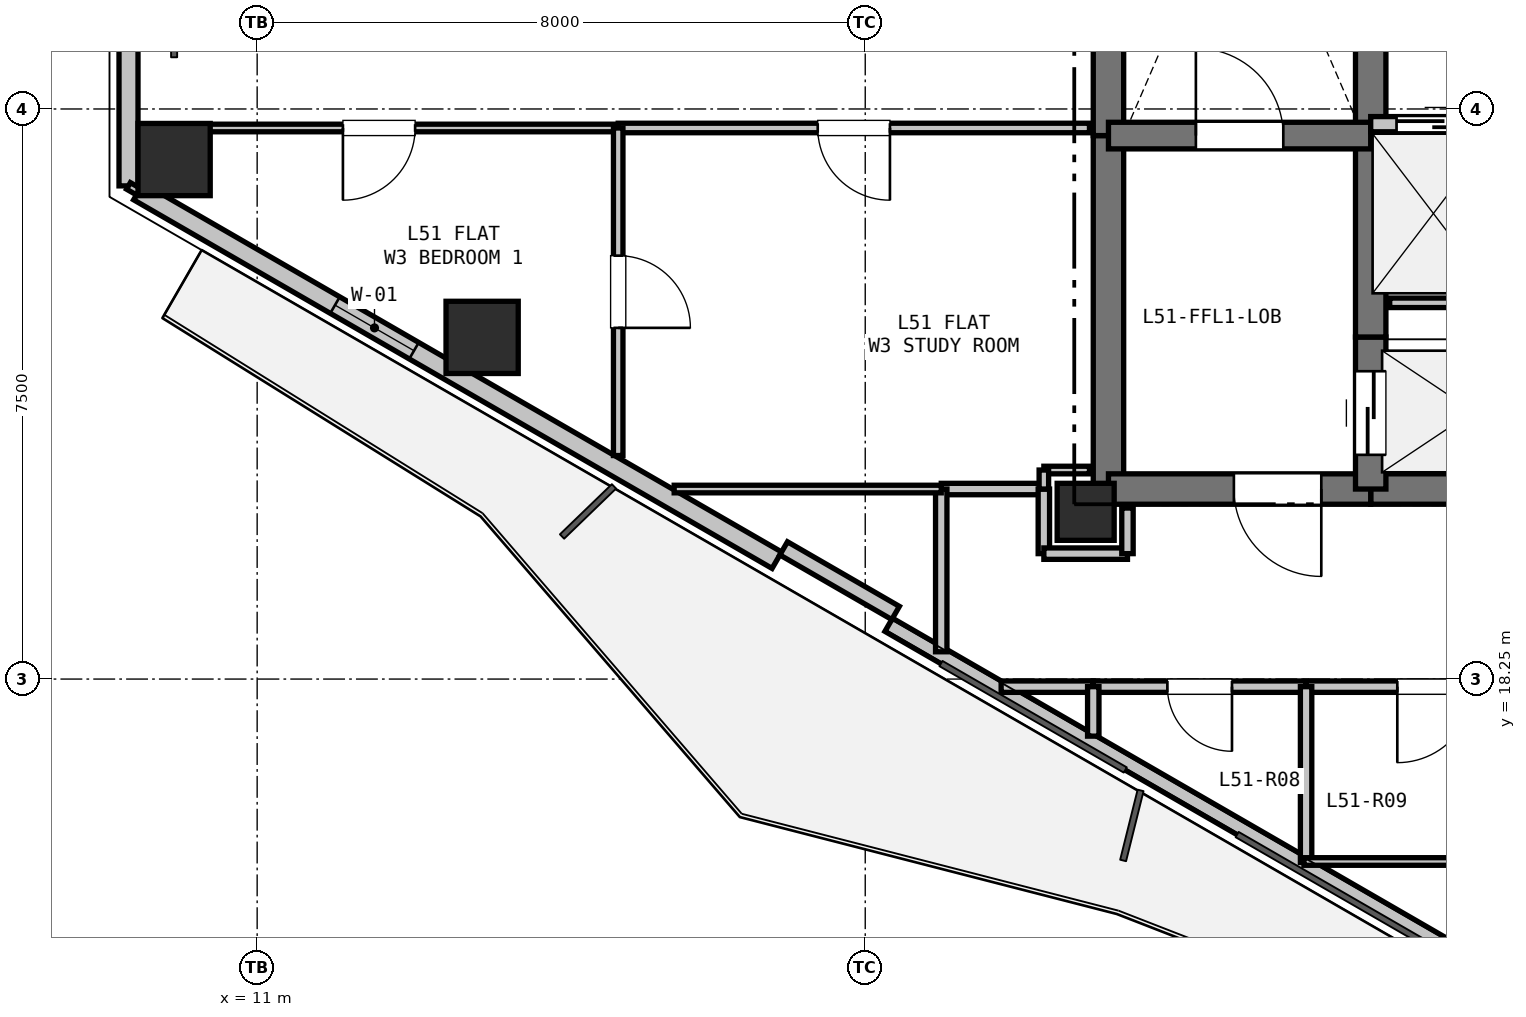
"""IFC4 building model, lengths in metres.
Left out: names, types, materials, properties, quantities, classifications, styles, units other than length and angle.
Written with IfcOpenShell. Run it as: python <this file> out.ifc"""

import sys

from ifc_helpers import new_model, si_unit, direction, frame, frame_2d, origin, origin_2d, place, context, subcontext, project, spatial, rectangle, hollow_rectangle, extrude, element, fill, save


model = new_model("IFC4")
c1 = context("Model", 3, precision=1e-05, world=origin(), true_north=direction((0.0, 1.0)))
c2 = subcontext(c1, "Body", "Model", "MODEL_VIEW")
j1 = project(units=[si_unit("LENGTHUNIT", "METRE"), si_unit("PLANEANGLEUNIT", "RADIAN")], contexts=[c1])
p1 = place(None, origin())
s1 = spatial("IfcSite", under=j1, at=p1, CompositionType="ELEMENT")
p2 = place(p1, origin())
s2 = spatial("IfcBuilding", under=s1, at=p2, CompositionType="ELEMENT")
p3 = place(p2, frame((0.0, 0.0, 185.4)))
s3 = spatial("IfcBuildingStorey", under=s2, at=p3, CompositionType="ELEMENT", Elevation=185.4)
p4 = place(p3, frame((21.9, 20.45, 0.0), z_axis=(0.0, 0.0, 1.0), x_axis=(1.0, 0.0, 0.0)))
e1 = element("IfcColumn", 1, at=p4, inside=s3, PredefinedType="COLUMN", context=c2, shape_type="SweptSolid", body=[
    extrude(rectangle(XDim=0.75, YDim=0.75, at=origin_2d()), origin(), (0.0, 0.0, 1.0), 3.3),
])
for number, where, z_axis, x_axis in (
    (2, (13.96, 22.745, 0.0), (0.0, 0.0, 1.0), (1.0, 0.0, 0.0)),
    (3, (9.907, 25.085, 0.0), (0.0, 0.0, 1.0), (1.0, 0.0, 0.0)),
):
    element("IfcColumn", number, at=place(p3, frame(where, z_axis=z_axis, x_axis=x_axis)), inside=s3, PredefinedType="COLUMN", context=c2, shape_type="SweptSolid", body=[
        extrude(hollow_rectangle(XDim=0.95, YDim=0.95, WallThickness=0.028, at=origin_2d()), origin(), (0.0, 0.0, 1.0), 3.3),
    ])
p5 = place(p3, frame((9.308, 24.738, 0.0), z_axis=(0.0, 0.0, 1.0), x_axis=(0.0, 1.0, 0.0)))
e4 = element("IfcWall", 4, at=p5, inside=s3, PredefinedType="SOLIDWALL", context=c2, shape_type="SweptSolid", body=[
    extrude(rectangle(XDim=4.023, YDim=0.25, at=frame_2d((2.012, 0.0))), origin(), (0.0, 0.0, 1.0), 2.69),
])
p6 = place(p3, frame((27.102, 14.464, 0.0), z_axis=(0.0, 0.0, 1.0), x_axis=(-0.866020680503, 0.500008180874, 0.0)))
e5 = element("IfcWall", 5, at=p6, inside=s3, PredefinedType="PARAPET", context=c2, shape_type="SweptSolid", body=[
    extrude(rectangle(XDim=8.999, YDim=0.2, at=frame_2d((4.5, 0.0))), origin(), (0.0, 0.0, 1.0), 0.2),
])
p7 = place(p3, frame((17.837, 19.814, 0.0), z_axis=(0.0, 0.0, 1.0), x_axis=(-0.866027133173, 0.499997004599, 0.0)))
e6 = element("IfcWall", 6, at=p7, inside=s3, PredefinedType="SOLIDWALL", context=c2, shape_type="SweptSolid", body=[
    extrude(rectangle(XDim=9.699, YDim=0.25, at=frame_2d((4.849, 0.0))), origin(), (0.0, 0.0, 1.0), 2.69),
])
p8 = place(p7, frame((5.512, 0.0, 0.9)))
e7 = element("IfcOpeningElement", 7, at=p8, cuts=e6, PredefinedType="OPENING", context=c2, shape_type="SweptSolid", body=[
    extrude(rectangle(XDim=1.2, YDim=1.4, at=frame_2d((0.6, 0.7))), frame((0.0, 0.135, 0.0), z_axis=(0.0, -1.0, 0.0), x_axis=(1.0, 0.0, 0.0)), (0.0, 0.0, 1.0), 0.27),
])
p9 = place(p3, frame((19.399, 19.12, 0.0), z_axis=(0.0, 0.0, 1.0), x_axis=(-0.86605165483, 0.499954529098, 0.0)))
e8 = element("IfcWall", 8, at=p9, inside=s3, PredefinedType="PARAPET", context=c2, shape_type="SweptSolid", body=[
    extrude(rectangle(XDim=1.7, YDim=0.2, at=frame_2d((0.85, 0.0))), origin(), (0.0, 0.0, 1.0), 2.69),
])
p10 = place(p3, frame((22.2, 20.75, 0.0), z_axis=(0.0, 0.0, 1.0), x_axis=(0.0, 1.0, 0.0)))
e9 = element("IfcWall", 9, at=p10, inside=s3, PredefinedType="SHEAR", context=c2, shape_type="SweptSolid", body=[
    extrude(rectangle(XDim=4.65, YDim=0.4, at=frame_2d((2.325, 0.0))), origin(), (0.0, 0.0, 1.0), 3.07),
])
p11 = place(p3, frame((22.2, 25.4, 0.0), z_axis=(0.0, 0.0, 1.0), x_axis=(0.0, 1.0, 0.0)))
e10 = element("IfcWall", 10, at=p11, inside=s3, PredefinedType="SHEAR", context=c2, shape_type="SweptSolid", body=[
    extrude(rectangle(XDim=7.35, YDim=0.4, at=frame_2d((3.675, 0.0))), origin(), (0.0, 0.0, 1.0), 3.07),
])
p12 = place(p3, frame((28.35, 20.75, 0.0), z_axis=(0.0, 0.0, 1.0), x_axis=(-1.0, 0.0, 0.0)))
e11 = element("IfcWall", 11, at=p12, inside=s3, PredefinedType="SHEAR", context=c2, shape_type="SweptSolid", body=[
    extrude(rectangle(XDim=2.7, YDim=0.4, at=frame_2d((1.35, 0.0))), origin(), (0.0, 0.0, 1.0), 3.07),
])
p13 = place(p3, frame((25.65, 20.75, 0.0), z_axis=(0.0, 0.0, 1.0), x_axis=(-1.0, 0.0, 0.0)))
e12 = element("IfcWall", 12, at=p13, inside=s3, PredefinedType="SHEAR", context=c2, shape_type="SweptSolid", body=[
    extrude(rectangle(XDim=3.45, YDim=0.4, at=frame_2d((1.725, 0.0))), origin(), (0.0, 0.0, 1.0), 3.07),
])
p14 = place(p13, frame((0.65, 0.0, 0.0)))
e13 = element("IfcOpeningElement", 13, at=p14, cuts=e12, PredefinedType="OPENING", context=c2, shape_type="SweptSolid", body=[
    extrude(rectangle(XDim=1.15, YDim=2.15, at=frame_2d((0.575, 1.075))), frame((0.0, 0.21, 0.0), z_axis=(0.0, -1.0, 0.0), x_axis=(1.0, 0.0, 0.0)), (0.0, 0.0, 1.0), 0.42),
])
p15 = place(p3, frame((25.65, 20.75, 0.0), z_axis=(0.0, 0.0, 1.0), x_axis=(0.0, 1.0, 0.0)))
e14 = element("IfcWall", 14, at=p15, inside=s3, PredefinedType="SHEAR", context=c2, shape_type="SweptSolid", body=[
    extrude(rectangle(XDim=2.0, YDim=0.4, at=frame_2d((1.0, 0.0))), origin(), (0.0, 0.0, 1.0), 3.07),
])
p16 = place(p15, frame((0.45, 0.0, 0.0)))
e15 = element("IfcOpeningElement", 15, at=p16, cuts=e14, PredefinedType="OPENING", context=c2, shape_type="SweptSolid", body=[
    extrude(rectangle(XDim=1.1, YDim=2.15, at=frame_2d((0.55, 1.075))), frame((0.0, 0.21, 0.0), z_axis=(0.0, -1.0, 0.0), x_axis=(1.0, 0.0, 0.0)), (0.0, 0.0, 1.0), 0.42),
])
p17 = place(p3, frame((25.65, 22.75, 0.0), z_axis=(0.0, 0.0, 1.0), x_axis=(0.0, 1.0, 0.0)))
e16 = element("IfcWall", 16, at=p17, inside=s3, PredefinedType="SHEAR", context=c2, shape_type="SweptSolid", body=[
    extrude(rectangle(XDim=2.8, YDim=0.4, at=frame_2d((1.4, 0.0))), origin(), (0.0, 0.0, 1.0), 3.07),
])
p18 = place(p3, frame((25.65, 25.55, 0.0), z_axis=(0.0, 0.0, 1.0), x_axis=(0.0, 1.0, 0.0)))
e17 = element("IfcWall", 17, at=p18, inside=s3, PredefinedType="SHEAR", context=c2, shape_type="SweptSolid", body=[
    extrude(rectangle(XDim=2.4, YDim=0.4, at=frame_2d((1.2, 0.0))), origin(), (0.0, 0.0, 1.0), 3.07),
])
p19 = place(p3, frame((22.2, 25.4, 0.0), z_axis=(0.0, 0.0, 1.0), x_axis=(1.0, 0.0, 0.0)))
e18 = element("IfcWall", 18, at=p19, inside=s3, PredefinedType="SHEAR", context=c2, shape_type="SweptSolid", body=[
    extrude(rectangle(XDim=3.45, YDim=0.35, at=frame_2d((1.725, 0.0))), origin(), (0.0, 0.0, 1.0), 3.07),
])
p20 = place(p19, frame((1.15, 0.0, 0.0)))
e19 = element("IfcOpeningElement", 19, at=p20, cuts=e18, PredefinedType="OPENING", context=c2, shape_type="SweptSolid", body=[
    extrude(rectangle(XDim=1.15, YDim=2.15, at=frame_2d((0.575, 1.075))), frame((0.0, 0.185, 0.0), z_axis=(0.0, -1.0, 0.0), x_axis=(1.0, 0.0, 0.0)), (0.0, 0.0, 1.0), 0.37),
])
p21 = place(p3, frame((25.65, 25.55, 0.0), z_axis=(0.0, 0.0, 1.0), x_axis=(1.0, 0.0, 0.0)))
e20 = element("IfcWall", 20, at=p21, inside=s3, PredefinedType="PARTITIONING", context=c2, shape_type="SweptSolid", body=[
    extrude(rectangle(XDim=4.95, YDim=0.2, at=frame_2d((2.475, 0.0))), origin(), (0.0, 0.0, 1.0), 3.07),
])
p22 = place(p21, frame((0.34, 0.0, 0.0)))
e21 = element("IfcOpeningElement", 21, at=p22, cuts=e20, PredefinedType="OPENING", context=c2, shape_type="SweptSolid", body=[
    extrude(rectangle(XDim=1.1, YDim=2.15, at=frame_2d((0.55, 1.075))), frame((0.0, 0.11, 0.0), z_axis=(0.0, -1.0, 0.0), x_axis=(1.0, 0.0, 0.0)), (0.0, 0.0, 1.0), 0.22),
])
p23 = place(p21, frame((1.99, 0.0, 0.0)))
e22 = element("IfcOpeningElement", 22, at=p23, cuts=e20, PredefinedType="OPENING", context=c2, shape_type="SweptSolid", body=[
    extrude(rectangle(XDim=1.1, YDim=2.15, at=frame_2d((0.55, 1.075))), frame((0.0, 0.11, 0.0), z_axis=(0.0, -1.0, 0.0), x_axis=(1.0, 0.0, 0.0)), (0.0, 0.0, 1.0), 0.22),
])
p24 = place(p21, frame((3.64, 0.0, 0.0)))
e23 = element("IfcOpeningElement", 23, at=p24, cuts=e20, PredefinedType="OPENING", context=c2, shape_type="SweptSolid", body=[
    extrude(rectangle(XDim=1.1, YDim=2.15, at=frame_2d((0.55, 1.075))), frame((0.0, 0.11, 0.0), z_axis=(0.0, -1.0, 0.0), x_axis=(1.0, 0.0, 0.0)), (0.0, 0.0, 1.0), 0.22),
])
p25 = place(p3, frame((25.9, 23.2, 0.0), z_axis=(0.0, 0.0, 1.0), x_axis=(1.0, 0.0, 0.0)))
e24 = element("IfcWall", 24, at=p25, inside=s3, PredefinedType="PARTITIONING", context=c2, shape_type="SweptSolid", body=[
    extrude(rectangle(XDim=1.4, YDim=0.125, at=frame_2d((0.7, 0.0))), origin(), (0.0, 0.0, 1.0), 3.07),
])
p26 = place(p3, frame((20.0, 20.75, 0.0), z_axis=(0.0, 0.0, 1.0), x_axis=(1.0, 0.0, 0.0)))
e25 = element("IfcWall", 25, at=p26, inside=s3, PredefinedType="PARTITIONING", context=c2, shape_type="SweptSolid", body=[
    extrude(rectangle(XDim=1.35, YDim=0.15, at=frame_2d((0.675, 0.0))), origin(), (0.0, 0.0, 1.0), 2.518),
])
p27 = place(p3, frame((21.35, 20.75, 0.0), z_axis=(0.0, 0.0, 1.0), x_axis=(0.0, -1.0, 0.0)))
e26 = element("IfcWall", 26, at=p27, inside=s3, PredefinedType="PARTITIONING", context=c2, shape_type="SweptSolid", body=[
    extrude(rectangle(XDim=0.85, YDim=0.15, at=frame_2d((0.425, 0.0))), origin(), (0.0, 0.0, 1.0), 2.518),
])
p28 = place(p3, frame((21.35, 19.9, 0.0), z_axis=(0.0, 0.0, 1.0), x_axis=(1.0, 0.0, 0.0)))
e27 = element("IfcWall", 27, at=p28, inside=s3, PredefinedType="PARTITIONING", context=c2, shape_type="SweptSolid", body=[
    extrude(rectangle(XDim=1.1, YDim=0.15, at=frame_2d((0.55, 0.0))), origin(), (0.0, 0.0, 1.0), 2.518),
])
p29 = place(p3, frame((22.45, 19.9, 0.0), z_axis=(0.0, 0.0, 1.0), x_axis=(0.0, 1.0, 0.0)))
e28 = element("IfcWall", 28, at=p29, inside=s3, PredefinedType="PARTITIONING", context=c2, shape_type="SweptSolid", body=[
    extrude(rectangle(XDim=0.6, YDim=0.15, at=frame_2d((0.3, 0.0))), origin(), (0.0, 0.0, 1.0), 2.518),
])
p30 = place(p3, frame((28.2, 18.15, 0.0), z_axis=(0.0, 0.0, 1.0), x_axis=(-1.0, 0.0, 0.0)))
e29 = element("IfcWall", 29, at=p30, inside=s3, PredefinedType="PARTITIONING", context=c2, shape_type="SweptSolid", body=[
    extrude(rectangle(XDim=3.4, YDim=0.15, at=frame_2d((1.7, 0.0))), origin(), (0.0, 0.0, 1.0), 2.518),
])
p31 = place(p30, frame((1.2, 0.0, 0.0)))
e30 = element("IfcOpeningElement", 30, at=p31, cuts=e29, PredefinedType="OPENING", context=c2, shape_type="SweptSolid", body=[
    extrude(rectangle(XDim=1.0, YDim=2.15, at=frame_2d((0.5, 1.075))), frame((0.0, 0.085, 0.0), z_axis=(0.0, -1.0, 0.0), x_axis=(1.0, 0.0, 0.0)), (0.0, 0.0, 1.0), 0.17),
])
p32 = place(p3, frame((24.8, 18.15, 0.0), z_axis=(0.0, 0.0, 1.0), x_axis=(-1.0, 0.0, 0.0)))
e31 = element("IfcWall", 31, at=p32, inside=s3, PredefinedType="PARTITIONING", context=c2, shape_type="SweptSolid", body=[
    extrude(rectangle(XDim=2.8, YDim=0.15, at=frame_2d((1.4, 0.0))), origin(), (0.0, 0.0, 1.0), 2.365),
])
p33 = place(p32, frame((0.975, 0.0, 0.0)))
e32 = element("IfcOpeningElement", 32, at=p33, cuts=e31, PredefinedType="OPENING", context=c2, shape_type="SweptSolid", body=[
    extrude(rectangle(XDim=0.85, YDim=2.1, at=frame_2d((0.425, 1.05))), frame((0.0, 0.085, 0.0), z_axis=(0.0, -1.0, 0.0), x_axis=(1.0, 0.0, 0.0)), (0.0, 0.0, 1.0), 0.17),
])
p34 = place(p3, frame((22.0, 18.15, 0.0), z_axis=(0.0, 0.0, 1.0), x_axis=(-1.0, 0.0, 0.0)))
e33 = element("IfcWall", 33, at=p34, inside=s3, PredefinedType="PARTITIONING", context=c2, shape_type="SweptSolid", body=[
    extrude(rectangle(XDim=1.212, YDim=0.15, at=frame_2d((0.606, 0.0))), origin(), (0.0, 0.0, 1.0), 2.365),
])
p35 = place(p3, frame((20.0, 18.609, 0.0), z_axis=(0.0, 0.0, 1.0), x_axis=(0.0, 1.0, 0.0)))
e34 = element("IfcWall", 34, at=p35, inside=s3, PredefinedType="PARTITIONING", context=c2, shape_type="SweptSolid", body=[
    extrude(rectangle(XDim=2.141, YDim=0.15, at=frame_2d((1.071, 0.0))), origin(), (0.0, 0.0, 1.0), 2.365),
])
p36 = place(p3, frame((24.8, 18.15, 0.0), z_axis=(0.0, 0.0, 1.0), x_axis=(0.0, -1.0, 0.0)))
e35 = element("IfcWall", 35, at=p36, inside=s3, PredefinedType="PARTITIONING", context=c2, shape_type="SweptSolid", body=[
    extrude(rectangle(XDim=2.312, YDim=0.15, at=frame_2d((1.156, 0.0))), origin(), (0.0, 0.0, 1.0), 2.365),
])
p37 = place(p3, frame((22.0, 17.499, 0.0), z_axis=(0.0, 0.0, 1.0), x_axis=(0.0, 1.0, 0.0)))
e36 = element("IfcWall", 36, at=p37, inside=s3, PredefinedType="PARTITIONING", context=c2, shape_type="SweptSolid", body=[
    extrude(rectangle(XDim=0.651, YDim=0.15, at=frame_2d((0.325, 0.0))), origin(), (0.0, 0.0, 1.0), 2.365),
])
p38 = place(p3, frame((26.8, 15.85, 0.0), z_axis=(0.0, 0.0, 1.0), x_axis=(-1.0, 0.0, 0.0)))
e37 = element("IfcWall", 37, at=p38, inside=s3, PredefinedType="PARTITIONING", context=c2, shape_type="SweptSolid", body=[
    extrude(rectangle(XDim=2.029, YDim=0.1, at=frame_2d((1.014, 0.0))), origin(), (0.0, 0.0, 1.0), 2.365),
])
p39 = place(p3, frame((21.95, 25.5, 0.0), z_axis=(0.0, 0.0, 1.0), x_axis=(-1.0, 0.0, 0.0)))
e38 = element("IfcWall", 38, at=p39, inside=s3, PredefinedType="PARTITIONING", context=c2, shape_type="SweptSolid", body=[
    extrude(rectangle(XDim=6.2, YDim=0.125, at=frame_2d((3.1, 0.0))), origin(), (0.0, 0.0, 1.0), 2.595),
])
p40 = place(p39, frame((2.625, 0.0, 0.0)))
e39 = element("IfcOpeningElement", 39, at=p40, cuts=e38, PredefinedType="OPENING", context=c2, shape_type="SweptSolid", body=[
    extrude(rectangle(XDim=0.95, YDim=2.1, at=frame_2d((0.475, 1.05))), frame((0.0, 0.073, 0.0), z_axis=(0.0, -1.0, 0.0), x_axis=(1.0, 0.0, 0.0)), (0.0, 0.0, 1.0), 0.145),
])
p41 = place(p3, frame((15.75, 25.5, 0.0), z_axis=(0.0, 0.0, 1.0), x_axis=(-1.0, 0.0, 0.0)))
e40 = element("IfcWall", 40, at=p41, inside=s3, PredefinedType="PARTITIONING", context=c2, shape_type="SweptSolid", body=[
    extrude(rectangle(XDim=6.293, YDim=0.1, at=frame_2d((3.147, 0.0))), origin(), (0.0, 0.0, 1.0), 2.735),
])
p42 = place(p41, frame((2.672, 0.0, 0.0)))
e41 = element("IfcOpeningElement", 41, at=p42, cuts=e40, PredefinedType="OPENING", context=c2, shape_type="SweptSolid", body=[
    extrude(rectangle(XDim=0.95, YDim=2.1, at=frame_2d((0.475, 1.05))), frame((0.0, 0.06, 0.0), z_axis=(0.0, -1.0, 0.0), x_axis=(1.0, 0.0, 0.0)), (0.0, 0.0, 1.0), 0.12),
])
p43 = place(p3, frame((9.437, 24.663, 0.0), z_axis=(0.0, 0.0, 1.0), x_axis=(-0.866239593359, 0.499628829129, 0.0)))
e42 = element("IfcWall", 42, at=p43, inside=s3, PredefinedType="PARTITIONING", context=c2, shape_type="SweptSolid", body=[
    extrude(rectangle(XDim=0.15, YDim=0.1, at=frame_2d((0.075, 0.0))), origin(), (0.0, 0.0, 1.0), 3.07),
])
p44 = place(p3, frame((15.75, 25.5, 0.0), z_axis=(0.0, 0.0, 1.0), x_axis=(0.0, -1.0, 0.0)))
e43 = element("IfcWall", 43, at=p44, inside=s3, PredefinedType="PARTITIONING", context=c2, shape_type="SweptSolid", body=[
    extrude(rectangle(XDim=4.309, YDim=0.125, at=frame_2d((2.155, 0.0))), origin(), (0.0, 0.0, 1.0), 2.365),
])
p45 = place(p44, frame((1.68, 0.0, 0.0)))
e44 = element("IfcOpeningElement", 44, at=p45, cuts=e43, PredefinedType="OPENING", context=c2, shape_type="SweptSolid", body=[
    extrude(rectangle(XDim=0.95, YDim=2.1, at=frame_2d((0.475, 1.05))), frame((0.0, 0.073, 0.0), z_axis=(0.0, -1.0, 0.0), x_axis=(1.0, 0.0, 0.0)), (0.0, 0.0, 1.0), 0.145),
])
p46 = place(p3, frame((21.95, 21.0, 0.0), z_axis=(0.0, 0.0, 1.0), x_axis=(-1.0, 0.0, 0.0)))
e45 = element("IfcWall", 45, at=p46, inside=s3, PredefinedType="PARTITIONING", context=c2, shape_type="SweptSolid", body=[
    extrude(rectangle(XDim=0.6, YDim=0.1, at=frame_2d((0.3, 0.0))), origin(), (0.0, 0.0, 1.0), 2.595),
])
p47 = place(p3, frame((21.35, 21.0, 0.0), z_axis=(0.0, 0.0, 1.0), x_axis=(0.0, -1.0, 0.0)))
e46 = element("IfcWall", 46, at=p47, inside=s3, PredefinedType="PARTITIONING", context=c2, shape_type="SweptSolid", body=[
    extrude(rectangle(XDim=0.25, YDim=0.125, at=frame_2d((0.125, 0.0))), origin(), (0.0, 0.0, 1.0), 2.518),
])
p48 = place(p3, frame((20.0, 20.75, 0.0), z_axis=(0.0, 0.0, 1.0), x_axis=(-1.0, 0.0, 0.0)))
e47 = element("IfcWall", 47, at=p48, inside=s3, PredefinedType="PARTITIONING", context=c2, shape_type="SweptSolid", body=[
    extrude(rectangle(XDim=3.514, YDim=0.1, at=frame_2d((1.757, 0.0))), origin(), (0.0, 0.0, 1.0), 2.365),
])
p49 = place(p8, origin())
e48 = element("IfcWindow", 48, at=p49, inside=s3, PartitioningType="SINGLE_PANEL", PredefinedType="WINDOW", context=c2, shape_type="SweptSolid", body=[
    extrude(rectangle(XDim=1.2, YDim=1.4, at=frame_2d((0.6, 0.7))), frame((0.0, 0.03, 0.0), z_axis=(0.0, -1.0, 0.0), x_axis=(1.0, 0.0, 0.0)), (0.0, 0.0, 1.0), 0.06),
])
fill(e7, e48)
p50 = place(p22, origin())
e49 = element("IfcDoor", 49, at=p50, inside=s3, OperationType="SLIDING_TO_LEFT", PredefinedType="DOOR", context=c2, shape_type="SweptSolid", body=[
    extrude(rectangle(XDim=1.1, YDim=2.15, at=frame_2d((0.55, 1.075))), frame((0.0, 0.025, 0.0), z_axis=(0.0, -1.0, 0.0), x_axis=(1.0, 0.0, 0.0)), (0.0, 0.0, 1.0), 0.05),
])
fill(e21, e49)
p51 = place(p16, origin())
e50 = element("IfcDoor", 50, at=p51, inside=s3, OperationType="SLIDING_TO_LEFT", PredefinedType="DOOR", context=c2, shape_type="SweptSolid", body=[
    extrude(rectangle(XDim=1.1, YDim=2.15, at=frame_2d((0.55, 1.075))), frame((0.0, 0.025, 0.0), z_axis=(0.0, -1.0, 0.0), x_axis=(1.0, 0.0, 0.0)), (0.0, 0.0, 1.0), 0.05),
])
fill(e15, e50)
p52 = place(p20, origin())
e51 = element("IfcDoor", 51, at=p52, inside=s3, OperationType="SINGLE_SWING_LEFT", PredefinedType="DOOR", context=c2, shape_type="SweptSolid", body=[
    extrude(rectangle(XDim=1.15, YDim=2.15, at=frame_2d((0.575, 1.075))), frame((0.0, 0.025, 0.0), z_axis=(0.0, -1.0, 0.0), x_axis=(1.0, 0.0, 0.0)), (0.0, 0.0, 1.0), 0.05),
])
fill(e19, e51)
p53 = place(p14, origin())
e52 = element("IfcDoor", 52, at=p53, inside=s3, OperationType="SINGLE_SWING_LEFT", PredefinedType="DOOR", context=c2, shape_type="SweptSolid", body=[
    extrude(rectangle(XDim=1.15, YDim=2.15, at=frame_2d((0.575, 1.075))), frame((0.0, 0.025, 0.0), z_axis=(0.0, -1.0, 0.0), x_axis=(1.0, 0.0, 0.0)), (0.0, 0.0, 1.0), 0.05),
])
fill(e13, e52)
p54 = place(p33, origin())
e53 = element("IfcDoor", 53, at=p54, inside=s3, OperationType="SINGLE_SWING_LEFT", PredefinedType="DOOR", context=c2, shape_type="SweptSolid", body=[
    extrude(rectangle(XDim=0.85, YDim=2.1, at=frame_2d((0.425, 1.05))), frame((0.0, 0.025, 0.0), z_axis=(0.0, -1.0, 0.0), x_axis=(1.0, 0.0, 0.0)), (0.0, 0.0, 1.0), 0.05),
])
fill(e32, e53)
p55 = place(p31, origin())
e54 = element("IfcDoor", 54, at=p55, inside=s3, OperationType="SINGLE_SWING_RIGHT", PredefinedType="DOOR", context=c2, shape_type="SweptSolid", body=[
    extrude(rectangle(XDim=1.0, YDim=2.15, at=frame_2d((0.5, 1.075))), frame((0.0, 0.025, 0.0), z_axis=(0.0, -1.0, 0.0), x_axis=(1.0, 0.0, 0.0)), (0.0, 0.0, 1.0), 0.05),
])
fill(e30, e54)
p56 = place(p42, origin())
e55 = element("IfcDoor", 55, at=p56, inside=s3, OperationType="SINGLE_SWING_RIGHT", PredefinedType="DOOR", context=c2, shape_type="SweptSolid", body=[
    extrude(rectangle(XDim=0.95, YDim=2.1, at=frame_2d((0.475, 1.05))), frame((0.0, 0.025, 0.0), z_axis=(0.0, -1.0, 0.0), x_axis=(1.0, 0.0, 0.0)), (0.0, 0.0, 1.0), 0.05),
])
fill(e41, e55)
p57 = place(p40, origin())
e56 = element("IfcDoor", 56, at=p57, inside=s3, OperationType="SINGLE_SWING_LEFT", PredefinedType="DOOR", context=c2, shape_type="SweptSolid", body=[
    extrude(rectangle(XDim=0.95, YDim=2.1, at=frame_2d((0.475, 1.05))), frame((0.0, 0.025, 0.0), z_axis=(0.0, -1.0, 0.0), x_axis=(1.0, 0.0, 0.0)), (0.0, 0.0, 1.0), 0.05),
])
fill(e39, e56)
p58 = place(p45, origin())
e57 = element("IfcDoor", 57, at=p58, inside=s3, OperationType="SINGLE_SWING_RIGHT", PredefinedType="DOOR", context=c2, shape_type="SweptSolid", body=[
    extrude(rectangle(XDim=0.95, YDim=2.1, at=frame_2d((0.475, 1.05))), frame((0.0, 0.025, 0.0), z_axis=(0.0, -1.0, 0.0), x_axis=(1.0, 0.0, 0.0)), (0.0, 0.0, 1.0), 0.05),
])
fill(e44, e57)
save(model, sys.argv[1])
